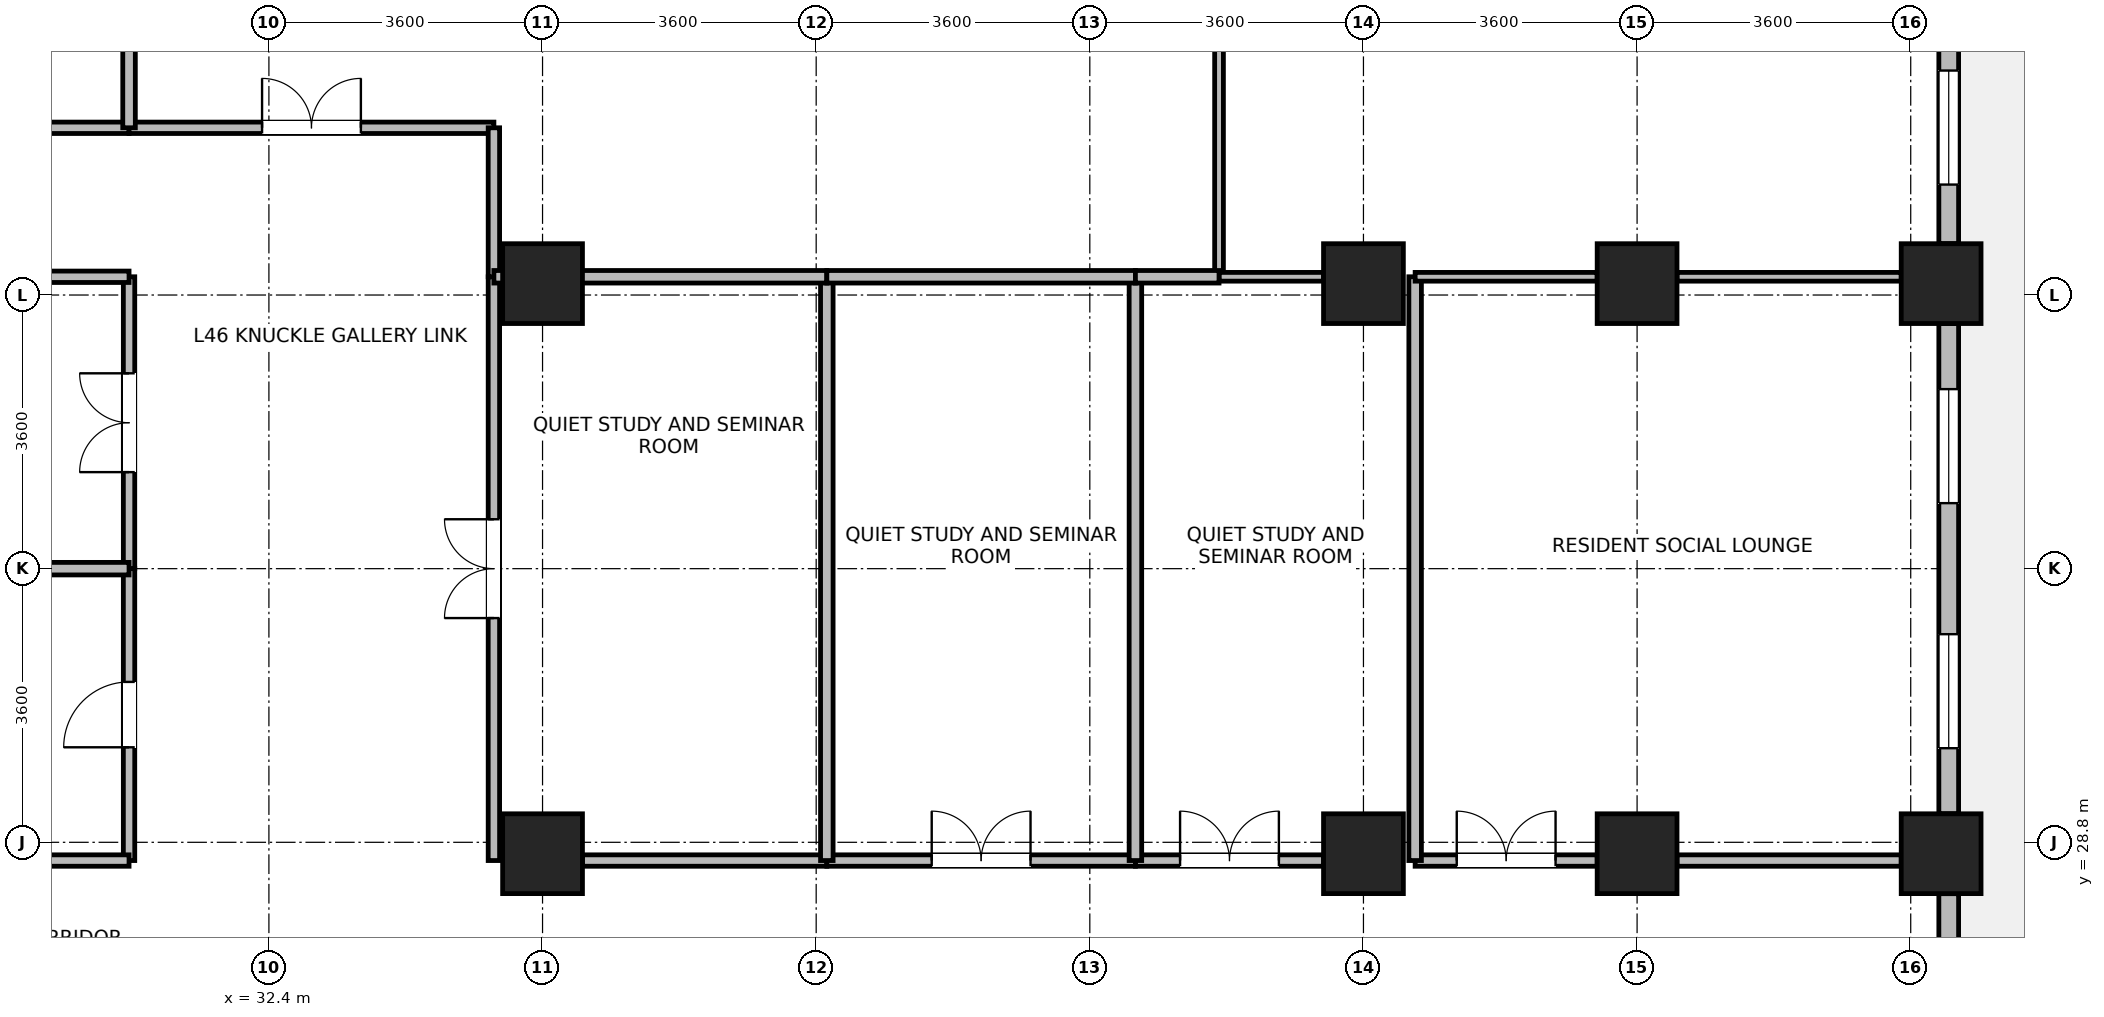
"""IFC4 building model, lengths in metres.
Left out: names, types, materials, properties, quantities, classifications, styles, units other than length and angle.
Written with IfcOpenShell. Run it as: python <this file> out.ifc"""

import sys

from ifc_helpers import new_model, si_unit, direction, frame, frame_2d, origin, origin_2d, place, context, subcontext, project, spatial, rectangle, extrude, source, transform, mapped, element, fill, save


model = new_model("IFC4")
c1 = context("Model", 3, precision=1e-05, world=origin(), true_north=direction((0.0, 1.0)))
c2 = subcontext(c1, "Body", "Model", "MODEL_VIEW")
j1 = project(units=[si_unit("LENGTHUNIT", "METRE"), si_unit("PLANEANGLEUNIT", "RADIAN")], contexts=[c1])
p1 = place(None, origin())
s1 = spatial("IfcSite", under=j1, at=p1, CompositionType="ELEMENT")
p2 = place(p1, origin())
s2 = spatial("IfcBuilding", under=s1, at=p2, CompositionType="ELEMENT")
p3 = place(p2, frame((0.0, 0.0, 180.9)))
s3 = spatial("IfcBuildingStorey", under=s2, at=p3, CompositionType="ELEMENT", Elevation=180.9)
m1 = source(origin(), c2, "Body", "SweptSolid", [
    extrude(rectangle(XDim=1.05, YDim=1.05, at=origin_2d()), origin(), (0.0, 0.0, 1.0), 3.7),
])
for number, where, z_axis, x_axis in (
    (1, (36.0, 28.65, 0.0), (0.0, 0.0, 1.0), (1.0, 0.0, 0.0)),
    (2, (36.0, 36.15, 0.0), (0.0, 0.0, 1.0), (1.0, 0.0, 0.0)),
    (3, (46.8, 28.65, 0.0), (0.0, 0.0, 1.0), (1.0, 0.0, 0.0)),
    (4, (46.8, 36.15, 0.0), (0.0, 0.0, 1.0), (1.0, 0.0, 0.0)),
    (5, (50.4, 28.65, 0.0), (0.0, 0.0, 1.0), (1.0, 0.0, 0.0)),
    (6, (50.4, 36.15, 0.0), (0.0, 0.0, 1.0), (1.0, 0.0, 0.0)),
    (7, (54.4, 28.65, 0.0), (0.0, 0.0, 1.0), (1.0, 0.0, 0.0)),
    (8, (54.4, 36.15, 0.0), (0.0, 0.0, 1.0), (1.0, 0.0, 0.0)),
):
    element("IfcColumn", number, at=place(p3, frame(where, z_axis=z_axis, x_axis=x_axis)), inside=s3, PredefinedType="COLUMN", context=c2, shape_type="MappedRepresentation", body=[
        mapped(m1, transform((0.0, 0.0, 0.0), x_axis=(1.0, 0.0, 0.0), y_axis=(0.0, 1.0, 0.0), z_axis=(0.0, 0.0, 1.0), scale=1.0)),
    ])
p4 = place(p3, frame((54.5, 28.124, 0.0), z_axis=(0.0, 0.0, 1.0), x_axis=(0.0, -1.0, 0.0)))
e9 = element("IfcWall", 9, at=p4, inside=s3, PredefinedType="STANDARD", context=c2, shape_type="SweptSolid", body=[
    extrude(rectangle(XDim=5.998, YDim=0.26, at=frame_2d((2.999, 0.0))), origin(), (0.0, 0.0, 1.0), 2.99),
])
p5 = place(p4, frame((3.749, 0.0, 0.85)))
e10 = element("IfcOpeningElement", 10, at=p5, cuts=e9, PredefinedType="OPENING", context=c2, shape_type="SweptSolid", body=[
    extrude(rectangle(XDim=1.5, YDim=1.85, at=frame_2d((0.75, 0.925))), frame((0.0, 0.14, 0.0), z_axis=(0.0, -1.0, 0.0), x_axis=(1.0, 0.0, 0.0)), (0.0, 0.0, 1.0), 0.28),
])
p6 = place(p4, frame((2.044, 0.0, 0.85)))
e11 = element("IfcOpeningElement", 11, at=p6, cuts=e9, PredefinedType="OPENING", context=c2, shape_type="SweptSolid", body=[
    extrude(rectangle(XDim=0.95, YDim=1.75, at=frame_2d((0.475, 0.875))), frame((0.0, 0.14, 0.0), z_axis=(0.0, -1.0, 0.0), x_axis=(1.0, 0.0, 0.0)), (0.0, 0.0, 1.0), 0.28),
])
p7 = place(p3, frame((54.5, 35.624, 0.0), z_axis=(0.0, 0.0, 1.0), x_axis=(0.0, -1.0, 0.0)))
e12 = element("IfcWall", 12, at=p7, inside=s3, PredefinedType="STANDARD", context=c2, shape_type="SweptSolid", body=[
    extrude(rectangle(XDim=6.448, YDim=0.26, at=frame_2d((3.224, 0.0))), origin(), (0.0, 0.0, 1.0), 2.99),
])
p8 = place(p7, frame((0.862, 0.0, 0.85)))
e13 = element("IfcOpeningElement", 13, at=p8, cuts=e12, PredefinedType="OPENING", context=c2, shape_type="SweptSolid", body=[
    extrude(rectangle(XDim=1.5, YDim=1.85, at=frame_2d((0.75, 0.925))), frame((0.0, 0.14, 0.0), z_axis=(0.0, -1.0, 0.0), x_axis=(1.0, 0.0, 0.0)), (0.0, 0.0, 1.0), 0.28),
])
p9 = place(p7, frame((4.086, 0.0, 0.85)))
e14 = element("IfcOpeningElement", 14, at=p9, cuts=e12, PredefinedType="OPENING", context=c2, shape_type="SweptSolid", body=[
    extrude(rectangle(XDim=1.5, YDim=1.85, at=frame_2d((0.75, 0.925))), frame((0.0, 0.14, 0.0), z_axis=(0.0, -1.0, 0.0), x_axis=(1.0, 0.0, 0.0)), (0.0, 0.0, 1.0), 0.28),
])
p10 = place(p3, frame((54.5, 39.73, 0.0), z_axis=(0.0, 0.0, 1.0), x_axis=(0.0, -1.0, 0.0)))
e15 = element("IfcWall", 15, at=p10, inside=s3, PredefinedType="STANDARD", context=c2, shape_type="SweptSolid", body=[
    extrude(rectangle(XDim=3.054, YDim=0.26, at=frame_2d((1.527, 0.0))), origin(), (0.0, 0.0, 1.0), 3.44),
])
p11 = place(p10, frame((0.777, 0.0, 0.85)))
e16 = element("IfcOpeningElement", 16, at=p11, cuts=e15, PredefinedType="OPENING", context=c2, shape_type="SweptSolid", body=[
    extrude(rectangle(XDim=1.5, YDim=1.85, at=frame_2d((0.75, 0.925))), frame((0.0, 0.14, 0.0), z_axis=(0.0, -1.0, 0.0), x_axis=(1.0, 0.0, 0.0)), (0.0, 0.0, 1.0), 0.28),
])
p12 = place(p3, frame((35.36, 28.56, 0.0), z_axis=(0.0, 0.0, 1.0), x_axis=(0.0, 1.0, 0.0)))
e17 = element("IfcWall", 17, at=p12, inside=s3, PredefinedType="PARTITIONING", context=c2, shape_type="SweptSolid", body=[
    extrude(rectangle(XDim=7.68, YDim=0.15, at=frame_2d((3.84, 0.0))), origin(), (0.0, 0.0, 1.0), 3.44),
])
p13 = place(p12, frame((3.19, 0.0, 0.0)))
e18 = element("IfcOpeningElement", 18, at=p13, cuts=e17, PredefinedType="OPENING", context=c2, shape_type="SweptSolid", body=[
    extrude(rectangle(XDim=1.3, YDim=2.12, at=frame_2d((0.65, 1.06))), frame((0.0, 0.085, 0.0), z_axis=(0.0, -1.0, 0.0), x_axis=(1.0, 0.0, 0.0)), (0.0, 0.0, 1.0), 0.17),
])
p14 = place(p3, frame((47.48, 28.56, 0.0), z_axis=(0.0, 0.0, 1.0), x_axis=(1.0, 0.0, 0.0)))
e19 = element("IfcWall", 19, at=p14, inside=s3, PredefinedType="PARTITIONING", context=c2, shape_type="SweptSolid", body=[
    extrude(rectangle(XDim=2.395, YDim=0.15, at=frame_2d((1.198, 0.0))), origin(), (0.0, 0.0, 1.0), 2.84),
])
p15 = place(p14, frame((0.548, 0.0, 0.0)))
e20 = element("IfcOpeningElement", 20, at=p15, cuts=e19, PredefinedType="OPENING", context=c2, shape_type="SweptSolid", body=[
    extrude(rectangle(XDim=1.3, YDim=2.12, at=frame_2d((0.65, 1.06))), frame((0.0, 0.085, 0.0), z_axis=(0.0, -1.0, 0.0), x_axis=(1.0, 0.0, 0.0)), (0.0, 0.0, 1.0), 0.17),
])
p16 = place(p3, frame((50.925, 28.56, 0.0), z_axis=(0.0, 0.0, 1.0), x_axis=(1.0, 0.0, 0.0)))
e21 = element("IfcWall", 21, at=p16, inside=s3, PredefinedType="PARTITIONING", context=c2, shape_type="SweptSolid", body=[
    extrude(rectangle(XDim=2.95, YDim=0.15, at=frame_2d((1.475, 0.0))), origin(), (0.0, 0.0, 1.0), 2.84),
])
p17 = place(p3, frame((24.5, 38.2, 0.0), z_axis=(0.0, 0.0, 1.0), x_axis=(1.0, 0.0, 0.0)))
e22 = element("IfcWall", 22, at=p17, inside=s3, PredefinedType="PARTITIONING", context=c2, shape_type="SweptSolid", body=[
    extrude(rectangle(XDim=6.06, YDim=0.15, at=frame_2d((3.03, 0.0))), origin(), (0.0, 0.0, 1.0), 3.44),
])
p18 = place(p17, frame((2.58, 0.0, 0.0)))
e23 = element("IfcOpeningElement", 23, at=p18, cuts=e22, PredefinedType="OPENING", context=c2, shape_type="SweptSolid", body=[
    extrude(rectangle(XDim=0.9, YDim=2.08, at=frame_2d((0.45, 1.04))), frame((0.0, 0.085, 0.0), z_axis=(0.0, -1.0, 0.0), x_axis=(1.0, 0.0, 0.0)), (0.0, 0.0, 1.0), 0.17),
])
p19 = place(p3, frame((30.56, 38.2, 0.0), z_axis=(0.0, 0.0, 1.0), x_axis=(1.0, 0.0, 0.0)))
e24 = element("IfcWall", 24, at=p19, inside=s3, PredefinedType="PARTITIONING", context=c2, shape_type="SweptSolid", body=[
    extrude(rectangle(XDim=4.8, YDim=0.15, at=frame_2d((2.4, 0.0))), origin(), (0.0, 0.0, 1.0), 3.44),
])
p20 = place(p19, frame((1.75, 0.0, 0.0)))
e25 = element("IfcOpeningElement", 25, at=p20, cuts=e24, PredefinedType="OPENING", context=c2, shape_type="SweptSolid", body=[
    extrude(rectangle(XDim=1.3, YDim=2.12, at=frame_2d((0.65, 1.06))), frame((0.0, 0.085, 0.0), z_axis=(0.0, -1.0, 0.0), x_axis=(1.0, 0.0, 0.0)), (0.0, 0.0, 1.0), 0.17),
])
p21 = place(p3, frame((36.525, 28.56, 0.0), z_axis=(0.0, 0.0, 1.0), x_axis=(1.0, 0.0, 0.0)))
e26 = element("IfcWall", 26, at=p21, inside=s3, PredefinedType="PARTITIONING", context=c2, shape_type="SweptSolid", body=[
    extrude(rectangle(XDim=3.215, YDim=0.15, at=frame_2d((1.607, 0.0))), origin(), (0.0, 0.0, 1.0), 2.84),
])
p22 = place(p3, frame((39.74, 28.56, 0.0), z_axis=(0.0, 0.0, 1.0), x_axis=(1.0, 0.0, 0.0)))
e27 = element("IfcWall", 27, at=p22, inside=s3, PredefinedType="PARTITIONING", context=c2, shape_type="SweptSolid", body=[
    extrude(rectangle(XDim=4.06, YDim=0.15, at=frame_2d((2.03, 0.0))), origin(), (0.0, 0.0, 1.0), 2.84),
])
p23 = place(p22, frame((1.38, 0.0, 0.0)))
e28 = element("IfcOpeningElement", 28, at=p23, cuts=e27, PredefinedType="OPENING", context=c2, shape_type="SweptSolid", body=[
    extrude(rectangle(XDim=1.3, YDim=2.12, at=frame_2d((0.65, 1.06))), frame((0.0, 0.085, 0.0), z_axis=(0.0, -1.0, 0.0), x_axis=(1.0, 0.0, 0.0)), (0.0, 0.0, 1.0), 0.17),
])
p24 = place(p3, frame((30.56, 32.4, 0.0), z_axis=(0.0, 0.0, 1.0), x_axis=(0.0, 1.0, 0.0)))
e29 = element("IfcWall", 29, at=p24, inside=s3, PredefinedType="PARTITIONING", context=c2, shape_type="SweptSolid", body=[
    extrude(rectangle(XDim=3.84, YDim=0.15, at=frame_2d((1.92, 0.0))), origin(), (0.0, 0.0, 1.0), 3.44),
])
p25 = place(p24, frame((1.27, 0.0, 0.0)))
e30 = element("IfcOpeningElement", 30, at=p25, cuts=e29, PredefinedType="OPENING", context=c2, shape_type="SweptSolid", body=[
    extrude(rectangle(XDim=1.3, YDim=2.12, at=frame_2d((0.65, 1.06))), frame((0.0, 0.085, 0.0), z_axis=(0.0, -1.0, 0.0), x_axis=(1.0, 0.0, 0.0)), (0.0, 0.0, 1.0), 0.17),
])
p26 = place(p3, frame((30.56, 28.56, 0.0), z_axis=(0.0, 0.0, 1.0), x_axis=(0.0, 1.0, 0.0)))
e31 = element("IfcWall", 31, at=p26, inside=s3, PredefinedType="PARTITIONING", context=c2, shape_type="SweptSolid", body=[
    extrude(rectangle(XDim=3.84, YDim=0.15, at=frame_2d((1.92, 0.0))), origin(), (0.0, 0.0, 1.0), 3.44),
])
p27 = place(p26, frame((1.49, 0.0, 0.0)))
e32 = element("IfcOpeningElement", 32, at=p27, cuts=e31, PredefinedType="OPENING", context=c2, shape_type="SweptSolid", body=[
    extrude(rectangle(XDim=0.86, YDim=2.02, at=frame_2d((0.43, 1.01))), frame((0.0, 0.085, 0.0), z_axis=(0.0, -1.0, 0.0), x_axis=(1.0, 0.0, 0.0)), (0.0, 0.0, 1.0), 0.17),
])
p28 = place(p3, frame((43.8, 28.56, 0.0), z_axis=(0.0, 0.0, 1.0), x_axis=(1.0, 0.0, 0.0)))
e33 = element("IfcWall", 33, at=p28, inside=s3, PredefinedType="PARTITIONING", context=c2, shape_type="SweptSolid", body=[
    extrude(rectangle(XDim=2.475, YDim=0.15, at=frame_2d((1.237, 0.0))), origin(), (0.0, 0.0, 1.0), 2.84),
])
p29 = place(p28, frame((0.587, 0.0, 0.0)))
e34 = element("IfcOpeningElement", 34, at=p29, cuts=e33, PredefinedType="OPENING", context=c2, shape_type="SweptSolid", body=[
    extrude(rectangle(XDim=1.3, YDim=2.12, at=frame_2d((0.65, 1.06))), frame((0.0, 0.085, 0.0), z_axis=(0.0, -1.0, 0.0), x_axis=(1.0, 0.0, 0.0)), (0.0, 0.0, 1.0), 0.17),
])
p30 = place(p3, frame((35.36, 36.24, 0.0), z_axis=(0.0, 0.0, 1.0), x_axis=(0.0, 1.0, 0.0)))
e35 = element("IfcWall", 35, at=p30, inside=s3, PredefinedType="PARTITIONING", context=c2, shape_type="SweptSolid", body=[
    extrude(rectangle(XDim=1.96, YDim=0.15, at=frame_2d((0.98, 0.0))), origin(), (0.0, 0.0, 1.0), 3.44),
])
for number, where, z_axis, x_axis in (
    (36, (29.325, 28.56, 0.0), (0.0, 0.0, 1.0), (1.0, 0.0, 0.0)),
    (37, (29.325, 36.24, 0.0), (0.0, 0.0, 1.0), (1.0, 0.0, 0.0)),
):
    element("IfcWall", number, at=place(p3, frame(where, z_axis=z_axis, x_axis=x_axis)), inside=s3, PredefinedType="PARTITIONING", context=c2, shape_type="SweptSolid", body=[
        extrude(rectangle(XDim=1.235, YDim=0.15, at=frame_2d((0.618, 0.0))), origin(), (0.0, 0.0, 1.0), 2.84),
    ])
for number, where, z_axis, x_axis in (
    (38, (39.74, 28.56, 0.0), (0.0, 0.0, 1.0), (0.0, 1.0, 0.0)),
    (39, (43.8, 28.56, 0.0), (0.0, 0.0, 1.0), (0.0, 1.0, 0.0)),
    (40, (47.48, 28.56, 0.0), (0.0, 0.0, 1.0), (0.0, 1.0, 0.0)),
):
    element("IfcWall", number, at=place(p3, frame(where, z_axis=z_axis, x_axis=x_axis)), inside=s3, PredefinedType="PARTITIONING", context=c2, shape_type="SweptSolid", body=[
        extrude(rectangle(XDim=7.68, YDim=0.165, at=frame_2d((3.84, 0.0))), origin(), (0.0, 0.0, 1.0), 3.44),
    ])
p31 = place(p3, frame((47.48, 36.24, 0.0), z_axis=(0.0, 0.0, 1.0), x_axis=(1.0, 0.0, 0.0)))
e41 = element("IfcWall", 41, at=p31, inside=s3, PredefinedType="PARTITIONING", context=c2, shape_type="SweptSolid", body=[
    extrude(rectangle(XDim=2.395, YDim=0.115, at=frame_2d((1.198, 0.0))), origin(), (0.0, 0.0, 1.0), 2.84),
])
p32 = place(p3, frame((50.925, 36.24, 0.0), z_axis=(0.0, 0.0, 1.0), x_axis=(1.0, 0.0, 0.0)))
e42 = element("IfcWall", 42, at=p32, inside=s3, PredefinedType="PARTITIONING", context=c2, shape_type="SweptSolid", body=[
    extrude(rectangle(XDim=2.95, YDim=0.115, at=frame_2d((1.475, 0.0))), origin(), (0.0, 0.0, 1.0), 2.84),
])
p33 = place(p3, frame((44.9, 36.24, 0.0), z_axis=(0.0, 0.0, 1.0), x_axis=(0.0, 1.0, 0.0)))
e43 = element("IfcWall", 43, at=p33, inside=s3, PredefinedType="PARTITIONING", context=c2, shape_type="SweptSolid", body=[
    extrude(rectangle(XDim=3.228, YDim=0.115, at=frame_2d((1.614, 0.0))), origin(), (0.0, 0.0, 1.0), 3.44),
])
p34 = place(p3, frame((30.56, 38.2, 0.0), z_axis=(0.0, 0.0, 1.0), x_axis=(0.0, 1.0, 0.0)))
e44 = element("IfcWall", 44, at=p34, inside=s3, PredefinedType="PARTITIONING", context=c2, shape_type="SweptSolid", body=[
    extrude(rectangle(XDim=4.868, YDim=0.165, at=frame_2d((2.434, 0.0))), origin(), (0.0, 0.0, 1.0), 3.44),
])
p35 = place(p3, frame((35.36, 36.24, 0.0), z_axis=(0.0, 0.0, 1.0), x_axis=(1.0, 0.0, 0.0)))
e45 = element("IfcWall", 45, at=p35, inside=s3, PredefinedType="PARTITIONING", context=c2, shape_type="SweptSolid", body=[
    extrude(rectangle(XDim=4.38, YDim=0.165, at=frame_2d((2.19, 0.0))), origin(), (0.0, 0.0, 1.0), 2.84),
])
p36 = place(p3, frame((39.74, 36.24, 0.0), z_axis=(0.0, 0.0, 1.0), x_axis=(1.0, 0.0, 0.0)))
e46 = element("IfcWall", 46, at=p36, inside=s3, PredefinedType="PARTITIONING", context=c2, shape_type="SweptSolid", body=[
    extrude(rectangle(XDim=4.06, YDim=0.165, at=frame_2d((2.03, 0.0))), origin(), (0.0, 0.0, 1.0), 2.84),
])
p37 = place(p3, frame((44.9, 36.24, 0.0), z_axis=(0.0, 0.0, 1.0), x_axis=(1.0, 0.0, 0.0)))
e47 = element("IfcWall", 47, at=p37, inside=s3, PredefinedType="PARTITIONING", context=c2, shape_type="SweptSolid", body=[
    extrude(rectangle(XDim=1.375, YDim=0.115, at=frame_2d((0.688, 0.0))), origin(), (0.0, 0.0, 1.0), 2.84),
])
p38 = place(p3, frame((28.84, 32.4, 0.0), z_axis=(0.0, 0.0, 1.0), x_axis=(1.0, 0.0, 0.0)))
e48 = element("IfcWall", 48, at=p38, inside=s3, PredefinedType="PARTITIONING", context=c2, shape_type="SweptSolid", body=[
    extrude(rectangle(XDim=1.72, YDim=0.165, at=frame_2d((0.86, 0.0))), origin(), (0.0, 0.0, 1.0), 3.44),
])
p39 = place(p3, frame((43.8, 36.24, 0.0), z_axis=(0.0, 0.0, 1.0), x_axis=(1.0, 0.0, 0.0)))
e49 = element("IfcWall", 49, at=p39, inside=s3, PredefinedType="PARTITIONING", context=c2, shape_type="SweptSolid", body=[
    extrude(rectangle(XDim=1.1, YDim=0.165, at=frame_2d((0.55, 0.0))), origin(), (0.0, 0.0, 1.0), 2.84),
])
p40 = place(p8, origin())
e50 = element("IfcWindow", 50, at=p40, inside=s3, PartitioningType="SINGLE_PANEL", PredefinedType="WINDOW", context=c2, shape_type="SweptSolid", body=[
    extrude(rectangle(XDim=1.5, YDim=1.85, at=frame_2d((0.75, 0.925))), frame((0.0, 0.03, 0.0), z_axis=(0.0, -1.0, 0.0), x_axis=(1.0, 0.0, 0.0)), (0.0, 0.0, 1.0), 0.06),
])
fill(e13, e50)
p41 = place(p9, origin())
e51 = element("IfcWindow", 51, at=p41, inside=s3, PartitioningType="SINGLE_PANEL", PredefinedType="WINDOW", context=c2, shape_type="SweptSolid", body=[
    extrude(rectangle(XDim=1.5, YDim=1.85, at=frame_2d((0.75, 0.925))), frame((0.0, 0.03, 0.0), z_axis=(0.0, -1.0, 0.0), x_axis=(1.0, 0.0, 0.0)), (0.0, 0.0, 1.0), 0.06),
])
fill(e14, e51)
p42 = place(p11, origin())
e52 = element("IfcWindow", 52, at=p42, inside=s3, PartitioningType="SINGLE_PANEL", PredefinedType="WINDOW", context=c2, shape_type="SweptSolid", body=[
    extrude(rectangle(XDim=1.5, YDim=1.85, at=frame_2d((0.75, 0.925))), frame((0.0, 0.03, 0.0), z_axis=(0.0, -1.0, 0.0), x_axis=(1.0, 0.0, 0.0)), (0.0, 0.0, 1.0), 0.06),
])
fill(e16, e52)
p43 = place(p13, origin())
e53 = element("IfcDoor", 53, at=p43, inside=s3, OperationType="DOUBLE_DOOR_SINGLE_SWING", PredefinedType="DOOR", context=c2, shape_type="SweptSolid", body=[
    extrude(rectangle(XDim=1.3, YDim=2.12, at=frame_2d((0.65, 1.06))), frame((0.0, 0.025, 0.0), z_axis=(0.0, -1.0, 0.0), x_axis=(1.0, 0.0, 0.0)), (0.0, 0.0, 1.0), 0.05),
])
fill(e18, e53)
p44 = place(p15, origin())
e54 = element("IfcDoor", 54, at=p44, inside=s3, OperationType="DOUBLE_DOOR_SINGLE_SWING", PredefinedType="DOOR", context=c2, shape_type="SweptSolid", body=[
    extrude(rectangle(XDim=1.3, YDim=2.12, at=frame_2d((0.65, 1.06))), frame((0.0, 0.025, 0.0), z_axis=(0.0, -1.0, 0.0), x_axis=(1.0, 0.0, 0.0)), (0.0, 0.0, 1.0), 0.05),
])
fill(e20, e54)
p45 = place(p20, origin())
e55 = element("IfcDoor", 55, at=p45, inside=s3, OperationType="DOUBLE_DOOR_SINGLE_SWING", PredefinedType="DOOR", context=c2, shape_type="SweptSolid", body=[
    extrude(rectangle(XDim=1.3, YDim=2.12, at=frame_2d((0.65, 1.06))), frame((0.0, 0.025, 0.0), z_axis=(0.0, -1.0, 0.0), x_axis=(1.0, 0.0, 0.0)), (0.0, 0.0, 1.0), 0.05),
])
fill(e25, e55)
p46 = place(p23, origin())
e56 = element("IfcDoor", 56, at=p46, inside=s3, OperationType="DOUBLE_DOOR_SINGLE_SWING", PredefinedType="DOOR", context=c2, shape_type="SweptSolid", body=[
    extrude(rectangle(XDim=1.3, YDim=2.12, at=frame_2d((0.65, 1.06))), frame((0.0, 0.025, 0.0), z_axis=(0.0, -1.0, 0.0), x_axis=(1.0, 0.0, 0.0)), (0.0, 0.0, 1.0), 0.05),
])
fill(e28, e56)
p47 = place(p25, origin())
e57 = element("IfcDoor", 57, at=p47, inside=s3, OperationType="DOUBLE_DOOR_SINGLE_SWING", PredefinedType="DOOR", context=c2, shape_type="SweptSolid", body=[
    extrude(rectangle(XDim=1.3, YDim=2.12, at=frame_2d((0.65, 1.06))), frame((0.0, 0.025, 0.0), z_axis=(0.0, -1.0, 0.0), x_axis=(1.0, 0.0, 0.0)), (0.0, 0.0, 1.0), 0.05),
])
fill(e30, e57)
p48 = place(p27, origin())
e58 = element("IfcDoor", 58, at=p48, inside=s3, OperationType="SINGLE_SWING_LEFT", PredefinedType="DOOR", context=c2, shape_type="SweptSolid", body=[
    extrude(rectangle(XDim=0.86, YDim=2.02, at=frame_2d((0.43, 1.01))), frame((0.0, 0.025, 0.0), z_axis=(0.0, -1.0, 0.0), x_axis=(1.0, 0.0, 0.0)), (0.0, 0.0, 1.0), 0.05),
])
fill(e32, e58)
p49 = place(p29, origin())
e59 = element("IfcDoor", 59, at=p49, inside=s3, OperationType="DOUBLE_DOOR_SINGLE_SWING", PredefinedType="DOOR", context=c2, shape_type="SweptSolid", body=[
    extrude(rectangle(XDim=1.3, YDim=2.12, at=frame_2d((0.65, 1.06))), frame((0.0, 0.025, 0.0), z_axis=(0.0, -1.0, 0.0), x_axis=(1.0, 0.0, 0.0)), (0.0, 0.0, 1.0), 0.05),
])
fill(e34, e59)
save(model, sys.argv[1])
